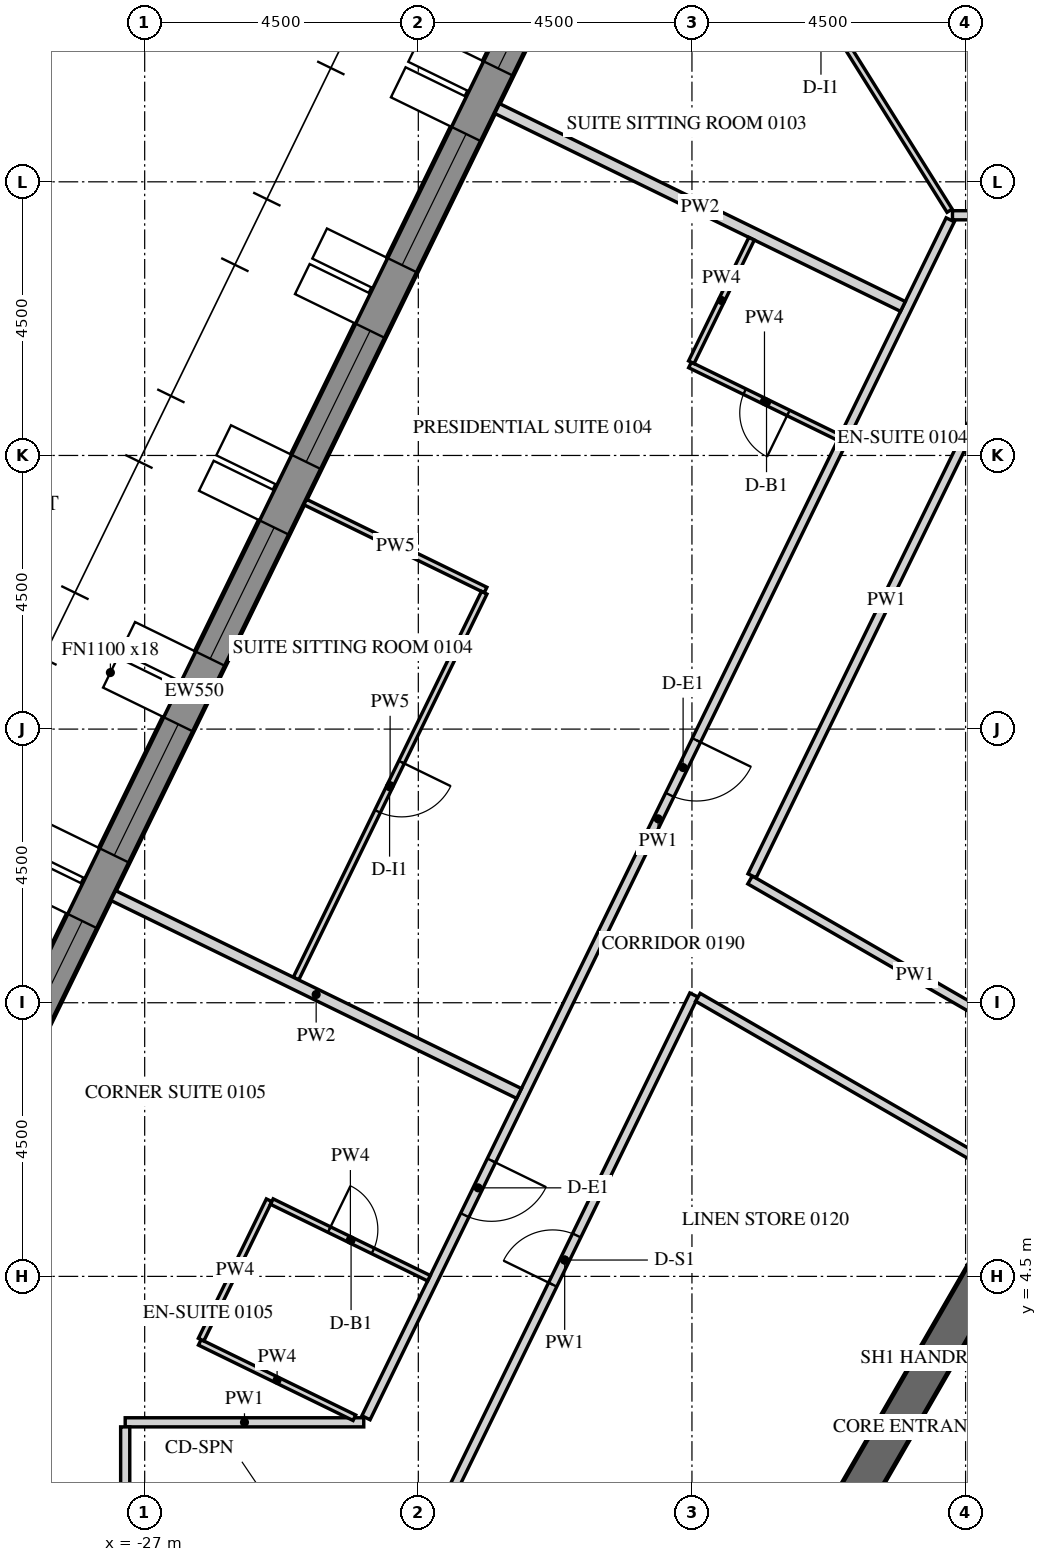
"""IFC4 building model, lengths in metres.
Left out: names, types, materials, properties, quantities, classifications, styles, units other than length and angle.
Written with IfcOpenShell. Run it as: python <this file> out.ifc"""

import sys

from ifc_helpers import new_model, si_unit, direction, frame, frame_2d, origin, place, context, subcontext, project, spatial, polyline, rectangle, outline, extrude, element, fill, save


model = new_model("IFC4")
c1 = context("Model", 3, precision=1e-05, world=origin(), true_north=direction((0.0, 1.0)))
c2 = subcontext(c1, "Body", "Model", "MODEL_VIEW")
j1 = project(units=[si_unit("LENGTHUNIT", "METRE"), si_unit("PLANEANGLEUNIT", "RADIAN")], contexts=[c1])
p1 = place(None, origin())
s1 = spatial("IfcSite", under=j1, at=p1, CompositionType="ELEMENT")
p2 = place(p1, origin())
s2 = spatial("IfcBuilding", under=s1, at=p2, CompositionType="ELEMENT")
p3 = place(p2, frame((0.0, 0.0, 37.5)))
s3 = spatial("IfcBuildingStorey", under=s2, at=p3, CompositionType="ELEMENT", Elevation=37.5)
p4 = place(p3, frame((-19.595, 27.633, -0.15), z_axis=(0.0, 0.0, 1.0), x_axis=(-0.438368285794, -0.898795441694, 0.0)))
e1 = element("IfcWall", 1, at=p4, inside=s3, PredefinedType="SOLIDWALL", context=c2, shape_type="SweptSolid", body=[
    extrude(outline(polyline([(-0.026, -0.275), (30.093, -0.275), (30.048, 0.275), (0.026, 0.275), (-0.026, -0.275)])), origin(), (0.0, 0.0, 1.0), 3.9),
])
p5 = place(p4, frame((1.236, 0.0, 1.05)))
e2 = element("IfcOpeningElement", 2, at=p5, cuts=e1, PredefinedType="OPENING", context=c2, shape_type="SweptSolid", body=[
    extrude(rectangle(XDim=2.4, YDim=2.4, at=frame_2d((1.2, 1.2))), frame((0.0, 0.285, 0.0), z_axis=(0.0, -1.0, 0.0), x_axis=(1.0, 0.0, 0.0)), (0.0, 0.0, 1.0), 0.57),
])
p6 = place(p4, frame((4.835, 0.0, 1.05)))
e3 = element("IfcOpeningElement", 3, at=p6, cuts=e1, PredefinedType="OPENING", context=c2, shape_type="SweptSolid", body=[
    extrude(rectangle(XDim=2.4, YDim=2.4, at=frame_2d((1.2, 1.2))), frame((0.0, 0.285, 0.0), z_axis=(0.0, -1.0, 0.0), x_axis=(1.0, 0.0, 0.0)), (0.0, 0.0, 1.0), 0.57),
])
p7 = place(p4, frame((8.436, 0.0, 1.05)))
e4 = element("IfcOpeningElement", 4, at=p7, cuts=e1, PredefinedType="OPENING", context=c2, shape_type="SweptSolid", body=[
    extrude(rectangle(XDim=2.4, YDim=2.4, at=frame_2d((1.2, 1.2))), frame((0.0, 0.285, 0.0), z_axis=(0.0, -1.0, 0.0), x_axis=(1.0, 0.0, 0.0)), (0.0, 0.0, 1.0), 0.57),
])
p8 = place(p4, frame((12.035, 0.0, 1.05)))
e5 = element("IfcOpeningElement", 5, at=p8, cuts=e1, PredefinedType="OPENING", context=c2, shape_type="SweptSolid", body=[
    extrude(rectangle(XDim=2.4, YDim=2.4, at=frame_2d((1.2, 1.2))), frame((0.0, 0.285, 0.0), z_axis=(0.0, -1.0, 0.0), x_axis=(1.0, 0.0, 0.0)), (0.0, 0.0, 1.0), 0.57),
])
p9 = place(p4, frame((15.635, 0.0, 1.05)))
e6 = element("IfcOpeningElement", 6, at=p9, cuts=e1, PredefinedType="OPENING", context=c2, shape_type="SweptSolid", body=[
    extrude(rectangle(XDim=2.4, YDim=2.4, at=frame_2d((1.2, 1.2))), frame((0.0, 0.285, 0.0), z_axis=(0.0, -1.0, 0.0), x_axis=(1.0, 0.0, 0.0)), (0.0, 0.0, 1.0), 0.57),
])
p10 = place(p4, frame((19.236, 0.0, 1.05)))
e7 = element("IfcOpeningElement", 7, at=p10, cuts=e1, PredefinedType="OPENING", context=c2, shape_type="SweptSolid", body=[
    extrude(rectangle(XDim=2.4, YDim=2.4, at=frame_2d((1.2, 1.2))), frame((0.0, 0.285, 0.0), z_axis=(0.0, -1.0, 0.0), x_axis=(1.0, 0.0, 0.0)), (0.0, 0.0, 1.0), 0.57),
])
p11 = place(p4, frame((22.835, 0.0, 1.05)))
e8 = element("IfcOpeningElement", 8, at=p11, cuts=e1, PredefinedType="OPENING", context=c2, shape_type="SweptSolid", body=[
    extrude(rectangle(XDim=2.4, YDim=2.4, at=frame_2d((1.2, 1.2))), frame((0.0, 0.285, 0.0), z_axis=(0.0, -1.0, 0.0), x_axis=(1.0, 0.0, 0.0)), (0.0, 0.0, 1.0), 0.57),
])
p12 = place(p4, frame((26.436, 0.0, 1.05)))
e9 = element("IfcOpeningElement", 9, at=p12, cuts=e1, PredefinedType="OPENING", context=c2, shape_type="SweptSolid", body=[
    extrude(rectangle(XDim=2.4, YDim=2.4, at=frame_2d((1.2, 1.2))), frame((0.0, 0.285, 0.0), z_axis=(0.0, -1.0, 0.0), x_axis=(1.0, 0.0, 0.0)), (0.0, 0.0, 1.0), 0.57),
])
p13 = place(p3, frame((-7.91, 13.7, -0.15), z_axis=(0.0, 0.0, 1.0), x_axis=(-0.499999880136, -0.866025472988, 0.0)))
e10 = element("IfcWall", 10, at=p13, inside=s3, PredefinedType="SHEAR", context=c2, shape_type="SweptSolid", body=[
    extrude(outline(polyline([(-0.173, -0.3), (15.993, -0.3), (15.646, 0.3), (0.173, 0.3), (-0.173, -0.3)])), origin(), (0.0, 0.0, 1.0), 3.9),
])
p14 = place(p13, frame((7.039, 0.0, 0.15)))
e11 = element("IfcOpeningElement", 11, at=p14, cuts=e10, PredefinedType="OPENING", context=c2, shape_type="SweptSolid", body=[
    extrude(rectangle(XDim=1.8, YDim=2.4, at=frame_2d((0.9, 1.2))), frame((0.0, 0.31, 0.0), z_axis=(0.0, -1.0, 0.0), x_axis=(1.0, 0.0, 0.0)), (0.0, 0.0, 1.0), 0.62),
])
p15 = place(p3, frame((10.161, 21.95, 0.0), z_axis=(0.0, 0.0, 1.0), x_axis=(-1.0, 0.0, 0.0)))
e12 = element("IfcWall", 12, at=p15, inside=s3, PredefinedType="PARTITIONING", context=c2, shape_type="SweptSolid", body=[
    extrude(rectangle(XDim=23.877, YDim=0.15, at=frame_2d((11.938, 0.0))), origin(), (0.0, 0.0, 1.0), 2.988),
])
p16 = place(p15, frame((2.643, 0.0, 0.0)))
e13 = element("IfcOpeningElement", 13, at=p16, cuts=e12, PredefinedType="OPENING", context=c2, shape_type="SweptSolid", body=[
    extrude(rectangle(XDim=1.0, YDim=2.1, at=frame_2d((0.5, 1.05))), frame((0.0, 0.085, 0.0), z_axis=(0.0, -1.0, 0.0), x_axis=(1.0, 0.0, 0.0)), (0.0, 0.0, 1.0), 0.17),
])
p17 = place(p15, frame((7.872, 0.0, 0.0)))
e14 = element("IfcOpeningElement", 14, at=p17, cuts=e12, PredefinedType="OPENING", context=c2, shape_type="SweptSolid", body=[
    extrude(rectangle(XDim=1.0, YDim=2.1, at=frame_2d((0.5, 1.05))), frame((0.0, 0.085, 0.0), z_axis=(0.0, -1.0, 0.0), x_axis=(1.0, 0.0, 0.0)), (0.0, 0.0, 1.0), 0.17),
])
p18 = place(p15, frame((20.125, 0.0, 0.0)))
e15 = element("IfcOpeningElement", 15, at=p18, cuts=e12, PredefinedType="OPENING", context=c2, shape_type="SweptSolid", body=[
    extrude(rectangle(XDim=1.0, YDim=2.1, at=frame_2d((0.5, 1.05))), frame((0.0, 0.085, 0.0), z_axis=(0.0, -1.0, 0.0), x_axis=(1.0, 0.0, 0.0)), (0.0, 0.0, 1.0), 0.17),
])
p19 = place(p3, frame((-13.752, 21.875, 0.0), z_axis=(0.0, 0.0, 1.0), x_axis=(-0.438374473378, -0.898792423806, 0.0)))
e16 = element("IfcWall", 16, at=p19, inside=s3, PredefinedType="PARTITIONING", context=c2, shape_type="SweptSolid", body=[
    extrude(rectangle(XDim=21.918, YDim=0.15, at=frame_2d((10.959, 0.0))), origin(), (0.0, 0.0, 1.0), 2.988),
])
p20 = place(p19, frame((9.521, 0.0, 0.0)))
e17 = element("IfcOpeningElement", 17, at=p20, cuts=e16, PredefinedType="OPENING", context=c2, shape_type="SweptSolid", body=[
    extrude(rectangle(XDim=1.0, YDim=2.1, at=frame_2d((0.5, 1.05))), frame((0.0, 0.085, 0.0), z_axis=(0.0, -1.0, 0.0), x_axis=(1.0, 0.0, 0.0)), (0.0, 0.0, 1.0), 0.17),
])
p21 = place(p19, frame((17.211, 0.0, 0.0)))
e18 = element("IfcOpeningElement", 18, at=p21, cuts=e16, PredefinedType="OPENING", context=c2, shape_type="SweptSolid", body=[
    extrude(rectangle(XDim=1.0, YDim=2.1, at=frame_2d((0.5, 1.05))), frame((0.0, 0.085, 0.0), z_axis=(0.0, -1.0, 0.0), x_axis=(1.0, 0.0, 0.0)), (0.0, 0.0, 1.0), 0.17),
])
p22 = place(p3, frame((-23.397, 2.1, 0.0), z_axis=(0.0, 0.0, 1.0), x_axis=(-1.0, 0.0, 0.0)))
e19 = element("IfcWall", 19, at=p22, inside=s3, PredefinedType="PARTITIONING", context=c2, shape_type="SweptSolid", body=[
    extrude(rectangle(XDim=3.923, YDim=0.15, at=frame_2d((1.961, 0.0))), origin(), (0.0, 0.0, 1.0), 2.988),
])
p23 = place(p3, frame((-27.32, 2.025, 0.0), z_axis=(0.0, 0.0, 1.0), x_axis=(0.0, -1.0, 0.0)))
e20 = element("IfcWall", 20, at=p23, inside=s3, PredefinedType="PARTITIONING", context=c2, shape_type="SweptSolid", body=[
    extrude(rectangle(XDim=1.725, YDim=0.15, at=frame_2d((0.862, 0.0))), origin(), (0.0, 0.0, 1.0), 2.988),
])
p24 = place(p3, frame((-11.614, 7.884, 0.0), z_axis=(0.0, 0.0, 1.0), x_axis=(-0.866025438137, 0.4999999405, 0.0)))
e21 = element("IfcWall", 21, at=p24, inside=s3, PredefinedType="PARTITIONING", context=c2, shape_type="SweptSolid", body=[
    extrude(rectangle(XDim=6.271, YDim=0.15, at=frame_2d((3.135, 0.0))), origin(), (0.0, 0.0, 1.0), 2.988),
])
p25 = place(p3, frame((-17.011, 11.087, 0.0), z_axis=(0.0, 0.0, 1.0), x_axis=(0.43836877185, 0.898795204631, 0.0)))
e22 = element("IfcWall", 22, at=p25, inside=s3, PredefinedType="PARTITIONING", context=c2, shape_type="SweptSolid", body=[
    extrude(rectangle(XDim=10.083, YDim=0.15, at=frame_2d((5.042, 0.0))), origin(), (0.0, 0.0, 1.0), 2.988),
])
p26 = place(p3, frame((-22.219, 0.41, 0.0), z_axis=(0.0, 0.0, 1.0), x_axis=(0.438391891827, 0.898783927972, 0.0)))
e23 = element("IfcWall", 23, at=p26, inside=s3, PredefinedType="PARTITIONING", context=c2, shape_type="SweptSolid", body=[
    extrude(rectangle(XDim=9.699, YDim=0.15, at=frame_2d((4.85, 0.0))), origin(), (0.0, 0.0, 1.0), 2.988),
])
p27 = place(p26, frame((4.4, 0.0, 0.0)))
e24 = element("IfcOpeningElement", 24, at=p27, cuts=e23, PredefinedType="OPENING", context=c2, shape_type="SweptSolid", body=[
    extrude(rectangle(XDim=0.9, YDim=2.1, at=frame_2d((0.45, 1.05))), frame((0.0, 0.085, 0.0), z_axis=(0.0, -1.0, 0.0), x_axis=(1.0, 0.0, 0.0)), (0.0, 0.0, 1.0), 0.17),
])
p28 = place(p3, frame((-17.902, 9.09, 0.0), z_axis=(0.0, 0.0, 1.0), x_axis=(0.866036368755, -0.499981007633, 0.0)))
e25 = element("IfcWall", 25, at=p28, inside=s3, PredefinedType="PARTITIONING", context=c2, shape_type="SweptSolid", body=[
    extrude(rectangle(XDim=6.049, YDim=0.15, at=frame_2d((3.024, 0.0))), origin(), (0.0, 0.0, 1.0), 2.988),
])
p29 = place(p3, frame((-18.041, 28.871, 0.0), z_axis=(0.0, 0.0, 1.0), x_axis=(0.529928260537, -0.848042474575, 0.0)))
e26 = element("IfcWall", 26, at=p29, inside=s3, PredefinedType="PARTITIONING", context=c2, shape_type="SweptSolid", body=[
    extrude(rectangle(XDim=8.073, YDim=0.1, at=frame_2d((4.037, 0.0))), origin(), (0.0, 0.0, 1.0), 2.988),
])
p30 = place(p29, frame((3.631, 0.0, 0.0)))
e27 = element("IfcOpeningElement", 27, at=p30, cuts=e26, PredefinedType="OPENING", context=c2, shape_type="SweptSolid", body=[
    extrude(rectangle(XDim=0.9, YDim=2.1, at=frame_2d((0.45, 1.05))), frame((0.0, 0.06, 0.0), z_axis=(0.0, -1.0, 0.0), x_axis=(1.0, 0.0, 0.0)), (0.0, 0.0, 1.0), 0.12),
])
p31 = place(p3, frame((-21.204, 23.706, 0.0), z_axis=(0.0, 0.0, 1.0), x_axis=(0.898796252669, -0.438366623032, 0.0)))
e28 = element("IfcWall", 28, at=p31, inside=s3, PredefinedType="PARTITIONING", context=c2, shape_type="SweptSolid", body=[
    extrude(rectangle(XDim=7.425, YDim=0.18, at=frame_2d((3.712, 0.0))), origin(), (0.0, 0.0, 1.0), 2.988),
])
p32 = place(p3, frame((-15.583, 18.293, 0.0), z_axis=(0.0, 0.0, 1.0), x_axis=(-0.898791692788, 0.43837597217, 0.0)))
e29 = element("IfcWall", 29, at=p32, inside=s3, PredefinedType="PARTITIONING", context=c2, shape_type="SweptSolid", body=[
    extrude(rectangle(XDim=2.725, YDim=0.1, at=frame_2d((1.363, 0.0))), origin(), (0.0, 0.0, 1.0), 2.988),
])
p33 = place(p32, frame((0.925, 0.0, 0.0)))
e30 = element("IfcOpeningElement", 30, at=p33, cuts=e29, PredefinedType="OPENING", context=c2, shape_type="SweptSolid", body=[
    extrude(rectangle(XDim=0.8, YDim=2.1, at=frame_2d((0.4, 1.05))), frame((0.0, 0.06, 0.0), z_axis=(0.0, -1.0, 0.0), x_axis=(1.0, 0.0, 0.0)), (0.0, 0.0, 1.0), 0.12),
])
p34 = place(p3, frame((-18.01, 19.533, 0.0), z_axis=(0.0, 0.0, 1.0), x_axis=(0.438376807268, 0.898791285477, 0.0)))
e31 = element("IfcWall", 31, at=p34, inside=s3, PredefinedType="PARTITIONING", context=c2, shape_type="SweptSolid", body=[
    extrude(rectangle(XDim=2.26, YDim=0.1, at=frame_2d((1.13, 0.0))), origin(), (0.0, 0.0, 1.0), 2.988),
])
p35 = place(p3, frame((-24.36, 17.234, 0.0), z_axis=(0.0, 0.0, 1.0), x_axis=(0.898793331681, -0.43837261197, 0.0)))
e32 = element("IfcWall", 32, at=p35, inside=s3, PredefinedType="PARTITIONING", context=c2, shape_type="SweptSolid", body=[
    extrude(rectangle(XDim=3.3, YDim=0.1, at=frame_2d((1.65, 0.0))), origin(), (0.0, 0.0, 1.0), 2.988),
])
p36 = place(p3, frame((-21.416, 15.743, 0.0), z_axis=(0.0, 0.0, 1.0), x_axis=(-0.438380708798, -0.898789382533, 0.0)))
e33 = element("IfcWall", 33, at=p36, inside=s3, PredefinedType="PARTITIONING", context=c2, shape_type="SweptSolid", body=[
    extrude(rectangle(XDim=7.06, YDim=0.1, at=frame_2d((3.53, 0.0))), origin(), (0.0, 0.0, 1.0), 2.988),
])
p37 = place(p36, frame((3.1, 0.0, 0.0)))
e34 = element("IfcOpeningElement", 34, at=p37, cuts=e33, PredefinedType="OPENING", context=c2, shape_type="SweptSolid", body=[
    extrude(rectangle(XDim=0.9, YDim=2.1, at=frame_2d((0.45, 1.05))), frame((0.0, 0.06, 0.0), z_axis=(0.0, -1.0, 0.0), x_axis=(1.0, 0.0, 0.0)), (0.0, 0.0, 1.0), 0.12),
])
p38 = place(p3, frame((-27.517, 10.763, 0.0), z_axis=(0.0, 0.0, 1.0), x_axis=(0.898789933843, -0.438379578473, 0.0)))
e35 = element("IfcWall", 35, at=p38, inside=s3, PredefinedType="PARTITIONING", context=c2, shape_type="SweptSolid", body=[
    extrude(rectangle(XDim=7.425, YDim=0.18, at=frame_2d((3.712, 0.0))), origin(), (0.0, 0.0, 1.0), 2.988),
])
p39 = place(p3, frame((-23.551, 2.175, 0.0), z_axis=(0.0, 0.0, 1.0), x_axis=(-0.89881903386, 0.438319910991, 0.0)))
e36 = element("IfcWall", 36, at=p39, inside=s3, PredefinedType="PARTITIONING", context=c2, shape_type="SweptSolid", body=[
    extrude(rectangle(XDim=2.829, YDim=0.1, at=frame_2d((1.415, 0.0))), origin(), (0.0, 0.0, 1.0), 2.988),
])
p40 = place(p3, frame((-26.072, 3.46, 0.0), z_axis=(0.0, 0.0, 1.0), x_axis=(0.438306676818, 0.898825487543, 0.0)))
e37 = element("IfcWall", 37, at=p40, inside=s3, PredefinedType="PARTITIONING", context=c2, shape_type="SweptSolid", body=[
    extrude(rectangle(XDim=2.55, YDim=0.1, at=frame_2d((1.275, 0.0))), origin(), (0.0, 0.0, 1.0), 2.988),
])
p41 = place(p3, frame((-24.909, 5.73, 0.0), z_axis=(0.0, 0.0, 1.0), x_axis=(0.898799457159, -0.438360052708, 0.0)))
e38 = element("IfcWall", 38, at=p41, inside=s3, PredefinedType="PARTITIONING", context=c2, shape_type="SweptSolid", body=[
    extrude(rectangle(XDim=2.875, YDim=0.1, at=frame_2d((1.438, 0.0))), origin(), (0.0, 0.0, 1.0), 2.988),
])
p42 = place(p41, frame((1.05, 0.0, 0.0)))
e39 = element("IfcOpeningElement", 39, at=p42, cuts=e38, PredefinedType="OPENING", context=c2, shape_type="SweptSolid", body=[
    extrude(rectangle(XDim=0.8, YDim=2.1, at=frame_2d((0.4, 1.05))), frame((0.0, 0.06, 0.0), z_axis=(0.0, -1.0, 0.0), x_axis=(1.0, 0.0, 0.0)), (0.0, 0.0, 1.0), 0.12),
])
p43 = place(p5, frame((0.0, 0.205, 0.0)))
e40 = element("IfcWindow", 40, at=p43, inside=s3, PartitioningType="DOUBLE_PANEL_VERTICAL", PredefinedType="WINDOW", context=c2, shape_type="SweptSolid", body=[
    extrude(rectangle(XDim=2.4, YDim=2.4, at=frame_2d((1.2, 1.2))), frame((0.0, 0.03, 0.0), z_axis=(0.0, -1.0, 0.0), x_axis=(1.0, 0.0, 0.0)), (0.0, 0.0, 1.0), 0.06),
])
fill(e2, e40)
p44 = place(p6, frame((0.0, 0.205, 0.0)))
e41 = element("IfcWindow", 41, at=p44, inside=s3, PartitioningType="DOUBLE_PANEL_VERTICAL", PredefinedType="WINDOW", context=c2, shape_type="SweptSolid", body=[
    extrude(rectangle(XDim=2.4, YDim=2.4, at=frame_2d((1.2, 1.2))), frame((0.0, 0.03, 0.0), z_axis=(0.0, -1.0, 0.0), x_axis=(1.0, 0.0, 0.0)), (0.0, 0.0, 1.0), 0.06),
])
fill(e3, e41)
p45 = place(p7, frame((0.0, 0.205, 0.0)))
e42 = element("IfcWindow", 42, at=p45, inside=s3, PartitioningType="DOUBLE_PANEL_VERTICAL", PredefinedType="WINDOW", context=c2, shape_type="SweptSolid", body=[
    extrude(rectangle(XDim=2.4, YDim=2.4, at=frame_2d((1.2, 1.2))), frame((0.0, 0.03, 0.0), z_axis=(0.0, -1.0, 0.0), x_axis=(1.0, 0.0, 0.0)), (0.0, 0.0, 1.0), 0.06),
])
fill(e4, e42)
p46 = place(p8, frame((0.0, 0.205, 0.0)))
e43 = element("IfcWindow", 43, at=p46, inside=s3, PartitioningType="DOUBLE_PANEL_VERTICAL", PredefinedType="WINDOW", context=c2, shape_type="SweptSolid", body=[
    extrude(rectangle(XDim=2.4, YDim=2.4, at=frame_2d((1.2, 1.2))), frame((0.0, 0.03, 0.0), z_axis=(0.0, -1.0, 0.0), x_axis=(1.0, 0.0, 0.0)), (0.0, 0.0, 1.0), 0.06),
])
fill(e5, e43)
p47 = place(p9, frame((0.0, 0.205, 0.0)))
e44 = element("IfcWindow", 44, at=p47, inside=s3, PartitioningType="DOUBLE_PANEL_VERTICAL", PredefinedType="WINDOW", context=c2, shape_type="SweptSolid", body=[
    extrude(rectangle(XDim=2.4, YDim=2.4, at=frame_2d((1.2, 1.2))), frame((0.0, 0.03, 0.0), z_axis=(0.0, -1.0, 0.0), x_axis=(1.0, 0.0, 0.0)), (0.0, 0.0, 1.0), 0.06),
])
fill(e6, e44)
p48 = place(p10, frame((0.0, 0.205, 0.0)))
e45 = element("IfcWindow", 45, at=p48, inside=s3, PartitioningType="DOUBLE_PANEL_VERTICAL", PredefinedType="WINDOW", context=c2, shape_type="SweptSolid", body=[
    extrude(rectangle(XDim=2.4, YDim=2.4, at=frame_2d((1.2, 1.2))), frame((0.0, 0.03, 0.0), z_axis=(0.0, -1.0, 0.0), x_axis=(1.0, 0.0, 0.0)), (0.0, 0.0, 1.0), 0.06),
])
fill(e7, e45)
p49 = place(p20, origin())
e46 = element("IfcDoor", 46, at=p49, inside=s3, OperationType="SINGLE_SWING_LEFT", PredefinedType="DOOR", context=c2, shape_type="SweptSolid", body=[
    extrude(rectangle(XDim=1.0, YDim=2.1, at=frame_2d((0.5, 1.05))), frame((0.0, 0.025, 0.0), z_axis=(0.0, -1.0, 0.0), x_axis=(1.0, 0.0, 0.0)), (0.0, 0.0, 1.0), 0.05),
])
fill(e17, e46)
p50 = place(p33, origin())
e47 = element("IfcDoor", 47, at=p50, inside=s3, OperationType="SINGLE_SWING_RIGHT", PredefinedType="DOOR", context=c2, shape_type="SweptSolid", body=[
    extrude(rectangle(XDim=0.8, YDim=2.1, at=frame_2d((0.4, 1.05))), frame((0.0, 0.025, 0.0), z_axis=(0.0, -1.0, 0.0), x_axis=(1.0, 0.0, 0.0)), (0.0, 0.0, 1.0), 0.05),
])
fill(e30, e47)
p51 = place(p37, origin())
e48 = element("IfcDoor", 48, at=p51, inside=s3, OperationType="SINGLE_SWING_LEFT", PredefinedType="DOOR", context=c2, shape_type="SweptSolid", body=[
    extrude(rectangle(XDim=0.9, YDim=2.1, at=frame_2d((0.45, 1.05))), frame((0.0, 0.025, 0.0), z_axis=(0.0, -1.0, 0.0), x_axis=(1.0, 0.0, 0.0)), (0.0, 0.0, 1.0), 0.05),
])
fill(e34, e48)
p52 = place(p21, origin())
e49 = element("IfcDoor", 49, at=p52, inside=s3, OperationType="SINGLE_SWING_LEFT", PredefinedType="DOOR", context=c2, shape_type="SweptSolid", body=[
    extrude(rectangle(XDim=1.0, YDim=2.1, at=frame_2d((0.5, 1.05))), frame((0.0, 0.025, 0.0), z_axis=(0.0, -1.0, 0.0), x_axis=(1.0, 0.0, 0.0)), (0.0, 0.0, 1.0), 0.05),
])
fill(e18, e49)
p53 = place(p42, origin())
e50 = element("IfcDoor", 50, at=p53, inside=s3, OperationType="SINGLE_SWING_RIGHT", PredefinedType="DOOR", context=c2, shape_type="SweptSolid", body=[
    extrude(rectangle(XDim=0.8, YDim=2.1, at=frame_2d((0.4, 1.05))), frame((0.0, 0.025, 0.0), z_axis=(0.0, -1.0, 0.0), x_axis=(1.0, 0.0, 0.0)), (0.0, 0.0, 1.0), 0.05),
])
fill(e39, e50)
p54 = place(p27, origin())
e51 = element("IfcDoor", 51, at=p54, inside=s3, OperationType="SINGLE_SWING_LEFT", PredefinedType="DOOR", context=c2, shape_type="SweptSolid", body=[
    extrude(rectangle(XDim=0.9, YDim=2.1, at=frame_2d((0.45, 1.05))), frame((0.0, 0.025, 0.0), z_axis=(0.0, -1.0, 0.0), x_axis=(1.0, 0.0, 0.0)), (0.0, 0.0, 1.0), 0.05),
])
fill(e24, e51)
save(model, sys.argv[1])
